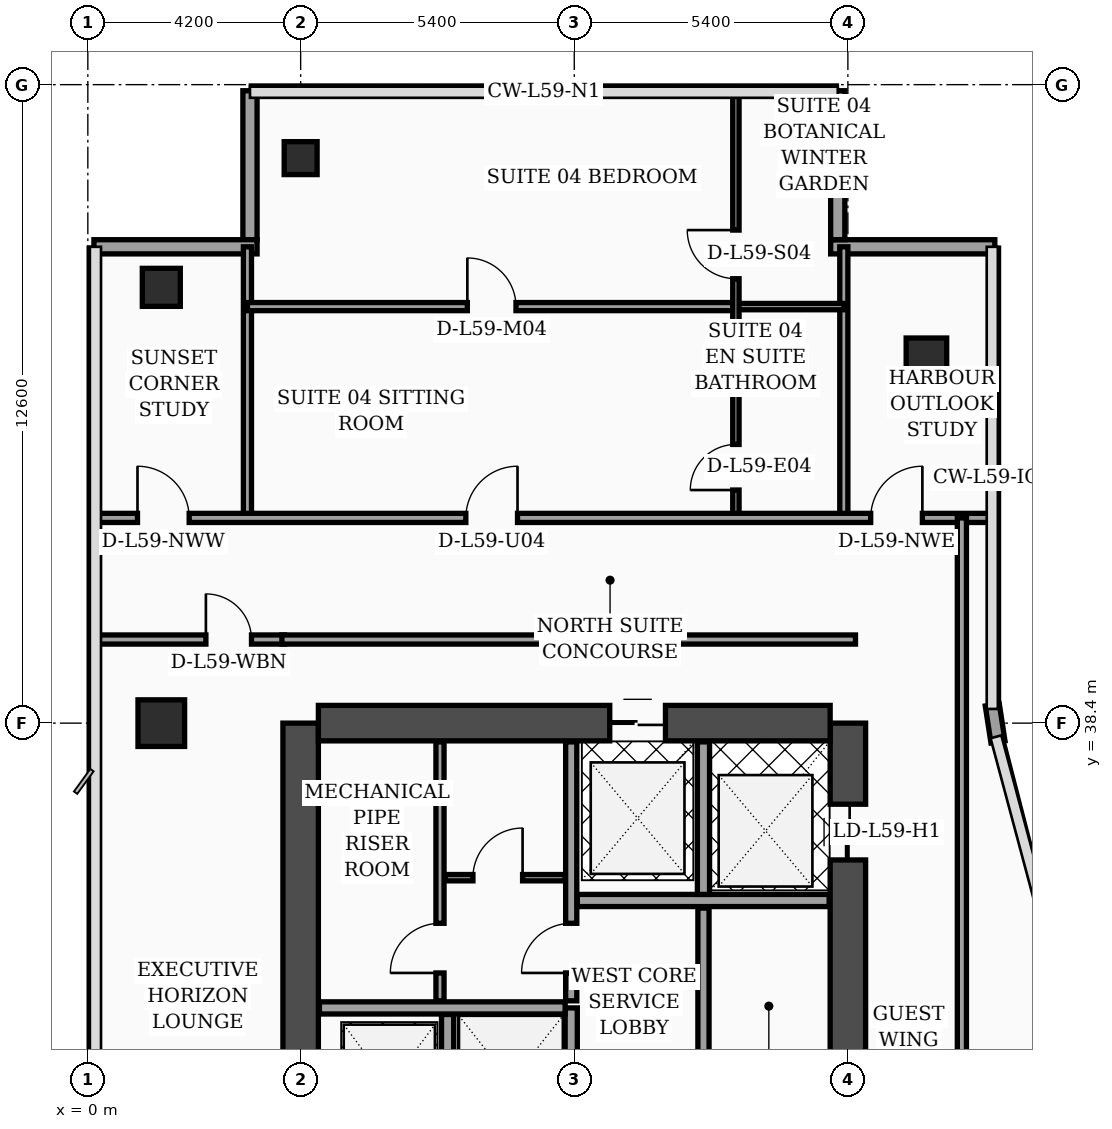
"""IFC4 building model, lengths in metres.
Left out: names, types, materials, properties, quantities, classifications, styles, units other than length and angle.
Written with IfcOpenShell. Run it as: python <this file> out.ifc"""

import sys

from ifc_helpers import new_model, si_unit, direction, frame, frame_2d, origin, origin_2d, place, context, subcontext, project, spatial, rectangle, hollow_rectangle, extrude, element, fill, save


model = new_model("IFC4")
c1 = context("Model", 3, precision=1e-05, world=origin(), true_north=direction((0.0, 1.0)))
c2 = subcontext(c1, "Body", "Model", "MODEL_VIEW")
j1 = project(units=[si_unit("LENGTHUNIT", "METRE"), si_unit("PLANEANGLEUNIT", "RADIAN")], contexts=[c1])
p1 = place(None, origin())
s1 = spatial("IfcSite", under=j1, at=p1, CompositionType="ELEMENT")
p2 = place(p1, origin())
s2 = spatial("IfcBuilding", under=s1, at=p2, CompositionType="ELEMENT")
p3 = place(p2, frame((0.0, 0.0, 239.3)))
s3 = spatial("IfcBuildingStorey", under=s2, at=p3, CompositionType="ELEMENT", Elevation=239.3)
p4 = place(p3, frame((4.2, 16.8, 0.0), z_axis=(0.0, 0.0, 1.0), x_axis=(0.0, 1.0, 0.0)))
e1 = element("IfcWall", 1, at=p4, inside=s3, PredefinedType="SHEAR", context=c2, shape_type="SweptSolid", body=[
    extrude(rectangle(XDim=21.6, YDim=0.7, at=frame_2d((10.8, 0.0))), origin(), (0.0, 0.0, 1.0), 4.05),
])
p5 = place(p3, frame((15.0, 16.8, 0.0), z_axis=(0.0, 0.0, 1.0), x_axis=(0.0, 1.0, 0.0)))
e2 = element("IfcWall", 2, at=p5, inside=s3, PredefinedType="SHEAR", context=c2, shape_type="SweptSolid", body=[
    extrude(rectangle(XDim=21.6, YDim=0.7, at=frame_2d((10.8, 0.0))), origin(), (0.0, 0.0, 1.0), 4.05),
])
p6 = place(p5, frame((8.65, 0.0, 0.0)))
e3 = element("IfcOpeningElement", 3, at=p6, cuts=e2, PredefinedType="OPENING", context=c2, shape_type="SweptSolid", body=[
    extrude(rectangle(XDim=1.1, YDim=2.2, at=frame_2d((0.55, 1.1))), frame((0.0, 0.36, 0.0), z_axis=(0.0, -1.0, 0.0), x_axis=(1.0, 0.0, 0.0)), (0.0, 0.0, 1.0), 0.72),
])
p7 = place(p5, frame((18.9, 0.0, 0.0)))
e4 = element("IfcOpeningElement", 4, at=p7, cuts=e2, PredefinedType="OPENING", context=c2, shape_type="SweptSolid", body=[
    extrude(rectangle(XDim=1.1, YDim=2.2, at=frame_2d((0.55, 1.1))), frame((0.0, 0.36, 0.0), z_axis=(0.0, -1.0, 0.0), x_axis=(1.0, 0.0, 0.0)), (0.0, 0.0, 1.0), 0.72),
])
p8 = place(p3, frame((4.55, 38.4, 0.0), z_axis=(0.0, 0.0, 1.0), x_axis=(1.0, 0.0, 0.0)))
e5 = element("IfcWall", 5, at=p8, inside=s3, PredefinedType="SHEAR", context=c2, shape_type="SweptSolid", body=[
    extrude(rectangle(XDim=10.1, YDim=0.7, at=frame_2d((5.05, 0.0))), origin(), (0.0, 0.0, 1.0), 4.05),
])
p9 = place(p8, frame((5.75, 0.0, 0.0)))
e6 = element("IfcOpeningElement", 6, at=p9, cuts=e5, PredefinedType="OPENING", context=c2, shape_type="SweptSolid", body=[
    extrude(rectangle(XDim=1.1, YDim=2.2, at=frame_2d((0.55, 1.1))), frame((0.0, 0.36, 0.0), z_axis=(0.0, -1.0, 0.0), x_axis=(1.0, 0.0, 0.0)), (0.0, 0.0, 1.0), 0.72),
])
p10 = place(p3, frame((1.45, 38.4, 0.0), z_axis=(0.0, 0.0, 1.0), x_axis=(1.0, 0.0, 0.0)))
e7 = element("IfcColumn", 7, at=p10, inside=s3, PredefinedType="COLUMN", context=c2, shape_type="SweptSolid", body=[
    extrude(rectangle(XDim=0.92, YDim=0.92, at=origin_2d()), origin(), (0.0, 0.0, 1.0), 4.05),
])
p11 = place(p3, frame((1.45, 47.0, 0.0), z_axis=(0.0, 0.0, 1.0), x_axis=(1.0, 0.0, 0.0)))
e8 = element("IfcColumn", 8, at=p11, inside=s3, PredefinedType="COLUMN", context=c2, shape_type="SweptSolid", body=[
    extrude(hollow_rectangle(XDim=0.75, YDim=0.75, WallThickness=0.032, at=origin_2d()), origin(), (0.0, 0.0, 1.0), 4.05),
])
p12 = place(p3, frame((4.2, 49.55, 0.0), z_axis=(0.0, 0.0, 1.0), x_axis=(1.0, 0.0, 0.0)))
e9 = element("IfcColumn", 9, at=p12, inside=s3, PredefinedType="COLUMN", context=c2, shape_type="SweptSolid", body=[
    extrude(hollow_rectangle(XDim=0.65, YDim=0.65, WallThickness=0.028, at=origin_2d()), origin(), (0.0, 0.0, 1.0), 4.05),
])
p13 = place(p3, frame((16.55, 45.6, 0.0), z_axis=(0.0, 0.0, 1.0), x_axis=(1.0, 0.0, 0.0)))
e10 = element("IfcColumn", 10, at=p13, inside=s3, PredefinedType="COLUMN", context=c2, shape_type="SweptSolid", body=[
    extrude(rectangle(XDim=0.8, YDim=0.8, at=origin_2d()), origin(), (0.0, 0.0, 1.0), 4.05),
])
p14 = place(p3, frame((17.962, 38.03, 0.0), z_axis=(0.0, 0.0, 1.0), x_axis=(-0.15141125477, 0.988470855377, 0.0)))
e11 = element("IfcWall", 11, at=p14, inside=s3, PredefinedType="SOLIDWALL", context=c2, shape_type="SweptSolid", body=[
    extrude(rectangle(XDim=0.739, YDim=0.28, at=frame_2d((0.369, 0.0))), origin(), (0.0, 0.0, 1.0), 4.05),
])
p15 = place(p3, frame((17.9, 47.8, 0.0), z_axis=(0.0, 0.0, 1.0), x_axis=(-1.0, 0.0, 0.0)))
e12 = element("IfcWall", 12, at=p15, inside=s3, PredefinedType="SOLIDWALL", context=c2, shape_type="SweptSolid", body=[
    extrude(rectangle(XDim=3.24, YDim=0.28, at=frame_2d((1.62, 0.0))), origin(), (0.0, 0.0, 1.0), 4.05),
])
p16 = place(p3, frame((14.8, 47.94, 0.0), z_axis=(0.0, 0.0, 1.0), x_axis=(0.0, 1.0, 0.0)))
e13 = element("IfcWall", 13, at=p16, inside=s3, PredefinedType="SOLIDWALL", context=c2, shape_type="SweptSolid", body=[
    extrude(rectangle(XDim=2.94, YDim=0.28, at=frame_2d((1.47, 0.0))), origin(), (0.0, 0.0, 1.0), 4.05),
])
p17 = place(p3, frame((3.2, 50.88, 0.0), z_axis=(0.0, 0.0, 1.0), x_axis=(0.0, -1.0, 0.0)))
e14 = element("IfcWall", 14, at=p17, inside=s3, PredefinedType="SOLIDWALL", context=c2, shape_type="SweptSolid", body=[
    extrude(rectangle(XDim=2.94, YDim=0.28, at=frame_2d((1.47, 0.0))), origin(), (0.0, 0.0, 1.0), 3.6),
])
p18 = place(p3, frame((3.34, 47.8, 0.0), z_axis=(0.0, 0.0, 1.0), x_axis=(-1.0, 0.0, 0.0)))
e15 = element("IfcWall", 15, at=p18, inside=s3, PredefinedType="SOLIDWALL", context=c2, shape_type="SweptSolid", body=[
    extrude(rectangle(XDim=3.22, YDim=0.28, at=frame_2d((1.61, 0.0))), origin(), (0.0, 0.0, 1.0), 3.6),
])
p19 = place(p3, frame((7.1, 30.02, 0.0), z_axis=(0.0, 0.0, 1.0), x_axis=(0.0, 1.0, 0.0)))
e16 = element("IfcWall", 16, at=p19, inside=s3, PredefinedType="SOLIDWALL", context=c2, shape_type="SweptSolid", body=[
    extrude(rectangle(XDim=2.63, YDim=0.24, at=frame_2d((1.315, 0.0))), origin(), (0.0, 0.0, 1.0), 4.05),
])
p20 = place(p3, frame((9.54, 29.88, 0.0), z_axis=(0.0, 0.0, 1.0), x_axis=(0.0, 1.0, 0.0)))
e17 = element("IfcWall", 17, at=p20, inside=s3, PredefinedType="SOLIDWALL", context=c2, shape_type="SweptSolid", body=[
    extrude(rectangle(XDim=2.9, YDim=0.24, at=frame_2d((1.45, 0.0))), origin(), (0.0, 0.0, 1.0), 4.05),
])
p21 = place(p20, frame((0.7, 0.0, 0.0)))
e18 = element("IfcOpeningElement", 18, at=p21, cuts=e17, PredefinedType="OPENING", context=c2, shape_type="SweptSolid", body=[
    extrude(rectangle(XDim=1.3, YDim=2.35, at=frame_2d((0.65, 1.175))), frame((0.0, 0.13, 0.0), z_axis=(0.0, -1.0, 0.0), x_axis=(1.0, 0.0, 0.0)), (0.0, 0.0, 1.0), 0.26),
])
p22 = place(p3, frame((4.57, 32.78, 0.0), z_axis=(0.0, 0.0, 1.0), x_axis=(1.0, 0.0, 0.0)))
e19 = element("IfcWall", 19, at=p22, inside=s3, PredefinedType="SOLIDWALL", context=c2, shape_type="SweptSolid", body=[
    extrude(rectangle(XDim=4.85, YDim=0.24, at=frame_2d((2.425, 0.0))), origin(), (0.0, 0.0, 1.0), 3.7),
])
p23 = place(p3, frame((6.95, 32.92, 0.0), z_axis=(0.0, 0.0, 1.0), x_axis=(0.0, 1.0, 0.0)))
e20 = element("IfcWall", 20, at=p23, inside=s3, PredefinedType="PARTITIONING", context=c2, shape_type="SweptSolid", body=[
    extrude(rectangle(XDim=5.11, YDim=0.16, at=frame_2d((2.555, 0.0))), origin(), (0.0, 0.0, 1.0), 4.05),
])
p24 = place(p23, frame((0.55, 0.0, 0.0)))
e21 = element("IfcOpeningElement", 21, at=p24, cuts=e20, PredefinedType="OPENING", context=c2, shape_type="SweptSolid", body=[
    extrude(rectangle(XDim=0.98, YDim=2.15, at=frame_2d((0.49, 1.075))), frame((0.0, 0.09, 0.0), z_axis=(0.0, -1.0, 0.0), x_axis=(1.0, 0.0, 0.0)), (0.0, 0.0, 1.0), 0.18),
])
p25 = place(p3, frame((7.05, 35.35, 0.0), z_axis=(0.0, 0.0, 1.0), x_axis=(1.0, 0.0, 0.0)))
e22 = element("IfcWall", 22, at=p25, inside=s3, PredefinedType="PARTITIONING", context=c2, shape_type="SweptSolid", body=[
    extrude(rectangle(XDim=2.37, YDim=0.125, at=frame_2d((1.185, 0.0))), origin(), (0.0, 0.0, 1.0), 4.05),
])
p26 = place(p25, frame((0.55, 0.0, 0.0)))
e23 = element("IfcOpeningElement", 23, at=p26, cuts=e22, PredefinedType="OPENING", context=c2, shape_type="SweptSolid", body=[
    extrude(rectangle(XDim=0.98, YDim=2.15, at=frame_2d((0.49, 1.075))), frame((0.0, 0.073, 0.0), z_axis=(0.0, -1.0, 0.0), x_axis=(1.0, 0.0, 0.0)), (0.0, 0.0, 1.0), 0.145),
])
p27 = place(p3, frame((9.54, 32.92, 0.0), z_axis=(0.0, 0.0, 1.0), x_axis=(0.0, 1.0, 0.0)))
e24 = element("IfcWall", 24, at=p27, inside=s3, PredefinedType="SOLIDWALL", context=c2, shape_type="SweptSolid", body=[
    extrude(rectangle(XDim=5.11, YDim=0.22, at=frame_2d((2.555, 0.0))), origin(), (0.0, 0.0, 1.0), 4.05),
])
p28 = place(p27, frame((0.55, 0.0, 0.0)))
e25 = element("IfcOpeningElement", 25, at=p28, cuts=e24, PredefinedType="OPENING", context=c2, shape_type="SweptSolid", body=[
    extrude(rectangle(XDim=0.98, YDim=2.15, at=frame_2d((0.49, 1.075))), frame((0.0, 0.12, 0.0), z_axis=(0.0, -1.0, 0.0), x_axis=(1.0, 0.0, 0.0)), (0.0, 0.0, 1.0), 0.24),
])
p29 = place(p3, frame((12.15, 27.0, 0.0), z_axis=(0.0, 0.0, 1.0), x_axis=(0.0, 1.0, 0.0)))
e26 = element("IfcWall", 26, at=p29, inside=s3, PredefinedType="SOLIDWALL", context=c2, shape_type="SweptSolid", body=[
    extrude(rectangle(XDim=7.75, YDim=0.22, at=frame_2d((3.875, 0.0))), origin(), (0.0, 0.0, 1.0), 4.05),
])
p30 = place(p29, frame((0.8, 0.0, 0.0)))
e27 = element("IfcOpeningElement", 27, at=p30, cuts=e26, PredefinedType="OPENING", context=c2, shape_type="SweptSolid", body=[
    extrude(rectangle(XDim=0.98, YDim=2.15, at=frame_2d((0.49, 1.075))), frame((0.0, 0.12, 0.0), z_axis=(0.0, -1.0, 0.0), x_axis=(1.0, 0.0, 0.0)), (0.0, 0.0, 1.0), 0.24),
])
p31 = place(p3, frame((9.66, 34.9, 0.0), z_axis=(0.0, 0.0, 1.0), x_axis=(1.0, 0.0, 0.0)))
e28 = element("IfcWall", 28, at=p31, inside=s3, PredefinedType="SOLIDWALL", context=c2, shape_type="SweptSolid", body=[
    extrude(rectangle(XDim=4.97, YDim=0.24, at=frame_2d((2.485, 0.0))), origin(), (0.0, 0.0, 1.0), 4.05),
])
p32 = place(p3, frame((12.15, 35.02, 0.0), z_axis=(0.0, 0.0, 1.0), x_axis=(0.0, 1.0, 0.0)))
e29 = element("IfcWall", 29, at=p32, inside=s3, PredefinedType="SOLIDWALL", context=c2, shape_type="SweptSolid", body=[
    extrude(rectangle(XDim=3.01, YDim=0.24, at=frame_2d((1.505, 0.0))), origin(), (0.0, 0.0, 1.0), 4.05),
])
p33 = place(p3, frame((0.08, 40.05, 0.0), z_axis=(0.0, 0.0, 1.0), x_axis=(1.0, 0.0, 0.0)))
e30 = element("IfcWall", 30, at=p33, inside=s3, PredefinedType="PARTITIONING", context=c2, shape_type="SweptSolid", body=[
    extrude(rectangle(XDim=3.8, YDim=0.18, at=frame_2d((1.9, 0.0))), origin(), (0.0, 0.0, 1.0), 3.5),
])
p34 = place(p33, frame((2.25, 0.0, 0.0)))
e31 = element("IfcOpeningElement", 31, at=p34, cuts=e30, PredefinedType="OPENING", context=c2, shape_type="SweptSolid", body=[
    extrude(rectangle(XDim=0.9, YDim=2.15, at=frame_2d((0.45, 1.075))), frame((0.0, 0.1, 0.0), z_axis=(0.0, -1.0, 0.0), x_axis=(1.0, 0.0, 0.0)), (0.0, 0.0, 1.0), 0.2),
])
p35 = place(p3, frame((3.15, 42.45, 0.0), z_axis=(0.0, 0.0, 1.0), x_axis=(0.0, 1.0, 0.0)))
e32 = element("IfcWall", 32, at=p35, inside=s3, PredefinedType="PARTITIONING", context=c2, shape_type="SweptSolid", body=[
    extrude(rectangle(XDim=5.35, YDim=0.16, at=frame_2d((2.675, 0.0))), origin(), (0.0, 0.0, 1.0), 3.65),
])
p36 = place(p3, frame((14.92, 42.45, 0.0), z_axis=(0.0, 0.0, 1.0), x_axis=(0.0, 1.0, 0.0)))
e33 = element("IfcWall", 33, at=p36, inside=s3, PredefinedType="PARTITIONING", context=c2, shape_type="SweptSolid", body=[
    extrude(rectangle(XDim=5.35, YDim=0.16, at=frame_2d((2.675, 0.0))), origin(), (0.0, 0.0, 1.0), 3.6),
])
p37 = place(p3, frame((12.79, 46.62, 0.0), z_axis=(0.0, 0.0, 1.0), x_axis=(1.0, 0.0, 0.0)))
e34 = element("IfcWall", 34, at=p37, inside=s3, PredefinedType="PARTITIONING", context=c2, shape_type="SweptSolid", body=[
    extrude(rectangle(XDim=2.13, YDim=0.125, at=frame_2d((1.065, 0.0))), origin(), (0.0, 0.0, 1.0), 3.6),
])
p38 = place(p3, frame((3.15, 46.62, 0.0), z_axis=(0.0, 0.0, 1.0), x_axis=(1.0, 0.0, 0.0)))
e35 = element("IfcWall", 35, at=p38, inside=s3, PredefinedType="PARTITIONING", context=c2, shape_type="SweptSolid", body=[
    extrude(rectangle(XDim=9.64, YDim=0.16, at=frame_2d((4.82, 0.0))), origin(), (0.0, 0.0, 1.0), 3.5),
])
p39 = place(p38, frame((4.34, 0.0, 0.0)))
e36 = element("IfcOpeningElement", 36, at=p39, cuts=e35, PredefinedType="OPENING", context=c2, shape_type="SweptSolid", body=[
    extrude(rectangle(XDim=0.96, YDim=2.2, at=frame_2d((0.48, 1.1))), frame((0.0, 0.09, 0.0), z_axis=(0.0, -1.0, 0.0), x_axis=(1.0, 0.0, 0.0)), (0.0, 0.0, 1.0), 0.18),
])
p40 = place(p3, frame((12.79, 42.45, 0.0), z_axis=(0.0, 0.0, 1.0), x_axis=(0.0, 1.0, 0.0)))
e37 = element("IfcWall", 37, at=p40, inside=s3, PredefinedType="PARTITIONING", context=c2, shape_type="SweptSolid", body=[
    extrude(rectangle(XDim=8.49, YDim=0.125, at=frame_2d((4.245, 0.0))), origin(), (0.0, 0.0, 1.0), 3.6),
])
p41 = place(p40, frame((0.55, 0.0, 0.0)))
e38 = element("IfcOpeningElement", 38, at=p41, cuts=e37, PredefinedType="OPENING", context=c2, shape_type="SweptSolid", body=[
    extrude(rectangle(XDim=0.9, YDim=2.15, at=frame_2d((0.45, 1.075))), frame((0.0, 0.073, 0.0), z_axis=(0.0, -1.0, 0.0), x_axis=(1.0, 0.0, 0.0)), (0.0, 0.0, 1.0), 0.145),
])
p42 = place(p40, frame((4.72, 0.0, 0.0)))
e39 = element("IfcOpeningElement", 39, at=p42, cuts=e37, PredefinedType="OPENING", context=c2, shape_type="SweptSolid", body=[
    extrude(rectangle(XDim=0.96, YDim=2.2, at=frame_2d((0.48, 1.1))), frame((0.0, 0.073, 0.0), z_axis=(0.0, -1.0, 0.0), x_axis=(1.0, 0.0, 0.0)), (0.0, 0.0, 1.0), 0.145),
])
p43 = place(p3, frame((0.08, 42.45, 0.0), z_axis=(0.0, 0.0, 1.0), x_axis=(1.0, 0.0, 0.0)))
e40 = element("IfcWall", 40, at=p43, inside=s3, PredefinedType="PARTITIONING", context=c2, shape_type="SweptSolid", body=[
    extrude(rectangle(XDim=17.77, YDim=0.18, at=frame_2d((8.885, 0.0))), origin(), (0.0, 0.0, 1.0), 3.5),
])
p44 = place(p43, frame((0.9, 0.0, 0.0)))
e41 = element("IfcOpeningElement", 41, at=p44, cuts=e40, PredefinedType="OPENING", context=c2, shape_type="SweptSolid", body=[
    extrude(rectangle(XDim=1.02, YDim=2.2, at=frame_2d((0.51, 1.1))), frame((0.0, 0.1, 0.0), z_axis=(0.0, -1.0, 0.0), x_axis=(1.0, 0.0, 0.0)), (0.0, 0.0, 1.0), 0.2),
])
p45 = place(p43, frame((7.38, 0.0, 0.0)))
e42 = element("IfcOpeningElement", 42, at=p45, cuts=e40, PredefinedType="OPENING", context=c2, shape_type="SweptSolid", body=[
    extrude(rectangle(XDim=1.02, YDim=2.2, at=frame_2d((0.51, 1.1))), frame((0.0, 0.1, 0.0), z_axis=(0.0, -1.0, 0.0), x_axis=(1.0, 0.0, 0.0)), (0.0, 0.0, 1.0), 0.2),
])
p46 = place(p43, frame((15.37, 0.0, 0.0)))
e43 = element("IfcOpeningElement", 43, at=p46, cuts=e40, PredefinedType="OPENING", context=c2, shape_type="SweptSolid", body=[
    extrude(rectangle(XDim=1.02, YDim=2.2, at=frame_2d((0.51, 1.1))), frame((0.0, 0.1, 0.0), z_axis=(0.0, -1.0, 0.0), x_axis=(1.0, 0.0, 0.0)), (0.0, 0.0, 1.0), 0.2),
])
p47 = place(p3, frame((17.25, 24.3, 0.0), z_axis=(0.0, 0.0, 1.0), x_axis=(0.0, 1.0, 0.0)))
e44 = element("IfcWall", 44, at=p47, inside=s3, PredefinedType="PARTITIONING", context=c2, shape_type="SweptSolid", body=[
    extrude(rectangle(XDim=18.15, YDim=0.18, at=frame_2d((9.075, 0.0))), origin(), (0.0, 0.0, 1.0), 3.5),
])
p48 = place(p47, frame((3.2, 0.0, 0.0)))
e45 = element("IfcOpeningElement", 45, at=p48, cuts=e44, PredefinedType="OPENING", context=c2, shape_type="SweptSolid", body=[
    extrude(rectangle(XDim=1.02, YDim=2.2, at=frame_2d((0.51, 1.1))), frame((0.0, 0.1, 0.0), z_axis=(0.0, -1.0, 0.0), x_axis=(1.0, 0.0, 0.0)), (0.0, 0.0, 1.0), 0.2),
])
p49 = place(p3, frame((3.83, 40.05, 0.0), z_axis=(0.0, 0.0, 1.0), x_axis=(1.0, 0.0, 0.0)))
e46 = element("IfcWall", 46, at=p49, inside=s3, PredefinedType="PARTITIONING", context=c2, shape_type="SweptSolid", body=[
    extrude(rectangle(XDim=11.32, YDim=0.18, at=frame_2d((5.66, 0.0))), origin(), (0.0, 0.0, 1.0), 3.5),
])
p50 = place(p24, origin())
e47 = element("IfcDoor", 47, at=p50, inside=s3, OperationType="SINGLE_SWING_LEFT", PredefinedType="DOOR", context=c2, shape_type="SweptSolid", body=[
    extrude(rectangle(XDim=0.98, YDim=2.15, at=frame_2d((0.49, 1.075))), frame((0.0, 0.025, 0.0), z_axis=(0.0, -1.0, 0.0), x_axis=(1.0, 0.0, 0.0)), (0.0, 0.0, 1.0), 0.05),
])
fill(e21, e47)
p51 = place(p26, origin())
e48 = element("IfcDoor", 48, at=p51, inside=s3, OperationType="SINGLE_SWING_RIGHT", PredefinedType="DOOR", context=c2, shape_type="SweptSolid", body=[
    extrude(rectangle(XDim=0.98, YDim=2.15, at=frame_2d((0.49, 1.075))), frame((0.0, 0.025, 0.0), z_axis=(0.0, -1.0, 0.0), x_axis=(1.0, 0.0, 0.0)), (0.0, 0.0, 1.0), 0.05),
])
fill(e23, e48)
p52 = place(p28, origin())
e49 = element("IfcDoor", 49, at=p52, inside=s3, OperationType="SINGLE_SWING_LEFT", PredefinedType="DOOR", context=c2, shape_type="SweptSolid", body=[
    extrude(rectangle(XDim=0.98, YDim=2.15, at=frame_2d((0.49, 1.075))), frame((0.0, 0.025, 0.0), z_axis=(0.0, -1.0, 0.0), x_axis=(1.0, 0.0, 0.0)), (0.0, 0.0, 1.0), 0.05),
])
fill(e25, e49)
p53 = place(p34, origin())
e50 = element("IfcDoor", 50, at=p53, inside=s3, OperationType="SINGLE_SWING_LEFT", PredefinedType="DOOR", context=c2, shape_type="SweptSolid", body=[
    extrude(rectangle(XDim=0.9, YDim=2.15, at=frame_2d((0.45, 1.075))), frame((0.0, 0.025, 0.0), z_axis=(0.0, -1.0, 0.0), x_axis=(1.0, 0.0, 0.0)), (0.0, 0.0, 1.0), 0.05),
])
fill(e31, e50)
p54 = place(p39, origin())
e51 = element("IfcDoor", 51, at=p54, inside=s3, OperationType="SINGLE_SWING_LEFT", PredefinedType="DOOR", context=c2, shape_type="SweptSolid", body=[
    extrude(rectangle(XDim=0.96, YDim=2.2, at=frame_2d((0.48, 1.1))), frame((0.0, 0.025, 0.0), z_axis=(0.0, -1.0, 0.0), x_axis=(1.0, 0.0, 0.0)), (0.0, 0.0, 1.0), 0.05),
])
fill(e36, e51)
p55 = place(p41, origin())
e52 = element("IfcDoor", 52, at=p55, inside=s3, OperationType="SINGLE_SWING_LEFT", PredefinedType="DOOR", context=c2, shape_type="SweptSolid", body=[
    extrude(rectangle(XDim=0.9, YDim=2.15, at=frame_2d((0.45, 1.075))), frame((0.0, 0.025, 0.0), z_axis=(0.0, -1.0, 0.0), x_axis=(1.0, 0.0, 0.0)), (0.0, 0.0, 1.0), 0.05),
])
fill(e38, e52)
p56 = place(p42, origin())
e53 = element("IfcDoor", 53, at=p56, inside=s3, OperationType="SINGLE_SWING_RIGHT", PredefinedType="DOOR", context=c2, shape_type="SweptSolid", body=[
    extrude(rectangle(XDim=0.96, YDim=2.2, at=frame_2d((0.48, 1.1))), frame((0.0, 0.025, 0.0), z_axis=(0.0, -1.0, 0.0), x_axis=(1.0, 0.0, 0.0)), (0.0, 0.0, 1.0), 0.05),
])
fill(e39, e53)
p57 = place(p44, origin())
e54 = element("IfcDoor", 54, at=p57, inside=s3, OperationType="SINGLE_SWING_LEFT", PredefinedType="DOOR", context=c2, shape_type="SweptSolid", body=[
    extrude(rectangle(XDim=1.02, YDim=2.2, at=frame_2d((0.51, 1.1))), frame((0.0, 0.025, 0.0), z_axis=(0.0, -1.0, 0.0), x_axis=(1.0, 0.0, 0.0)), (0.0, 0.0, 1.0), 0.05),
])
fill(e41, e54)
p58 = place(p45, origin())
e55 = element("IfcDoor", 55, at=p58, inside=s3, OperationType="SINGLE_SWING_RIGHT", PredefinedType="DOOR", context=c2, shape_type="SweptSolid", body=[
    extrude(rectangle(XDim=1.02, YDim=2.2, at=frame_2d((0.51, 1.1))), frame((0.0, 0.025, 0.0), z_axis=(0.0, -1.0, 0.0), x_axis=(1.0, 0.0, 0.0)), (0.0, 0.0, 1.0), 0.05),
])
fill(e42, e55)
p59 = place(p46, origin())
e56 = element("IfcDoor", 56, at=p59, inside=s3, OperationType="SINGLE_SWING_RIGHT", PredefinedType="DOOR", context=c2, shape_type="SweptSolid", body=[
    extrude(rectangle(XDim=1.02, YDim=2.2, at=frame_2d((0.51, 1.1))), frame((0.0, 0.025, 0.0), z_axis=(0.0, -1.0, 0.0), x_axis=(1.0, 0.0, 0.0)), (0.0, 0.0, 1.0), 0.05),
])
fill(e43, e56)
p60 = place(p7, origin())
e57 = element("IfcDoor", 57, at=p60, inside=s3, OperationType="DOUBLE_DOOR_SLIDING", PredefinedType="DOOR", context=c2, shape_type="SweptSolid", body=[
    extrude(rectangle(XDim=1.1, YDim=2.2, at=frame_2d((0.55, 1.1))), frame((0.0, 0.025, 0.0), z_axis=(0.0, -1.0, 0.0), x_axis=(1.0, 0.0, 0.0)), (0.0, 0.0, 1.0), 0.05),
])
fill(e4, e57)
p61 = place(p9, origin())
e58 = element("IfcDoor", 58, at=p61, inside=s3, OperationType="DOUBLE_DOOR_SLIDING", PredefinedType="DOOR", context=c2, shape_type="SweptSolid", body=[
    extrude(rectangle(XDim=1.1, YDim=2.2, at=frame_2d((0.55, 1.1))), frame((0.0, 0.025, 0.0), z_axis=(0.0, -1.0, 0.0), x_axis=(1.0, 0.0, 0.0)), (0.0, 0.0, 1.0), 0.05),
])
fill(e6, e58)
save(model, sys.argv[1])
